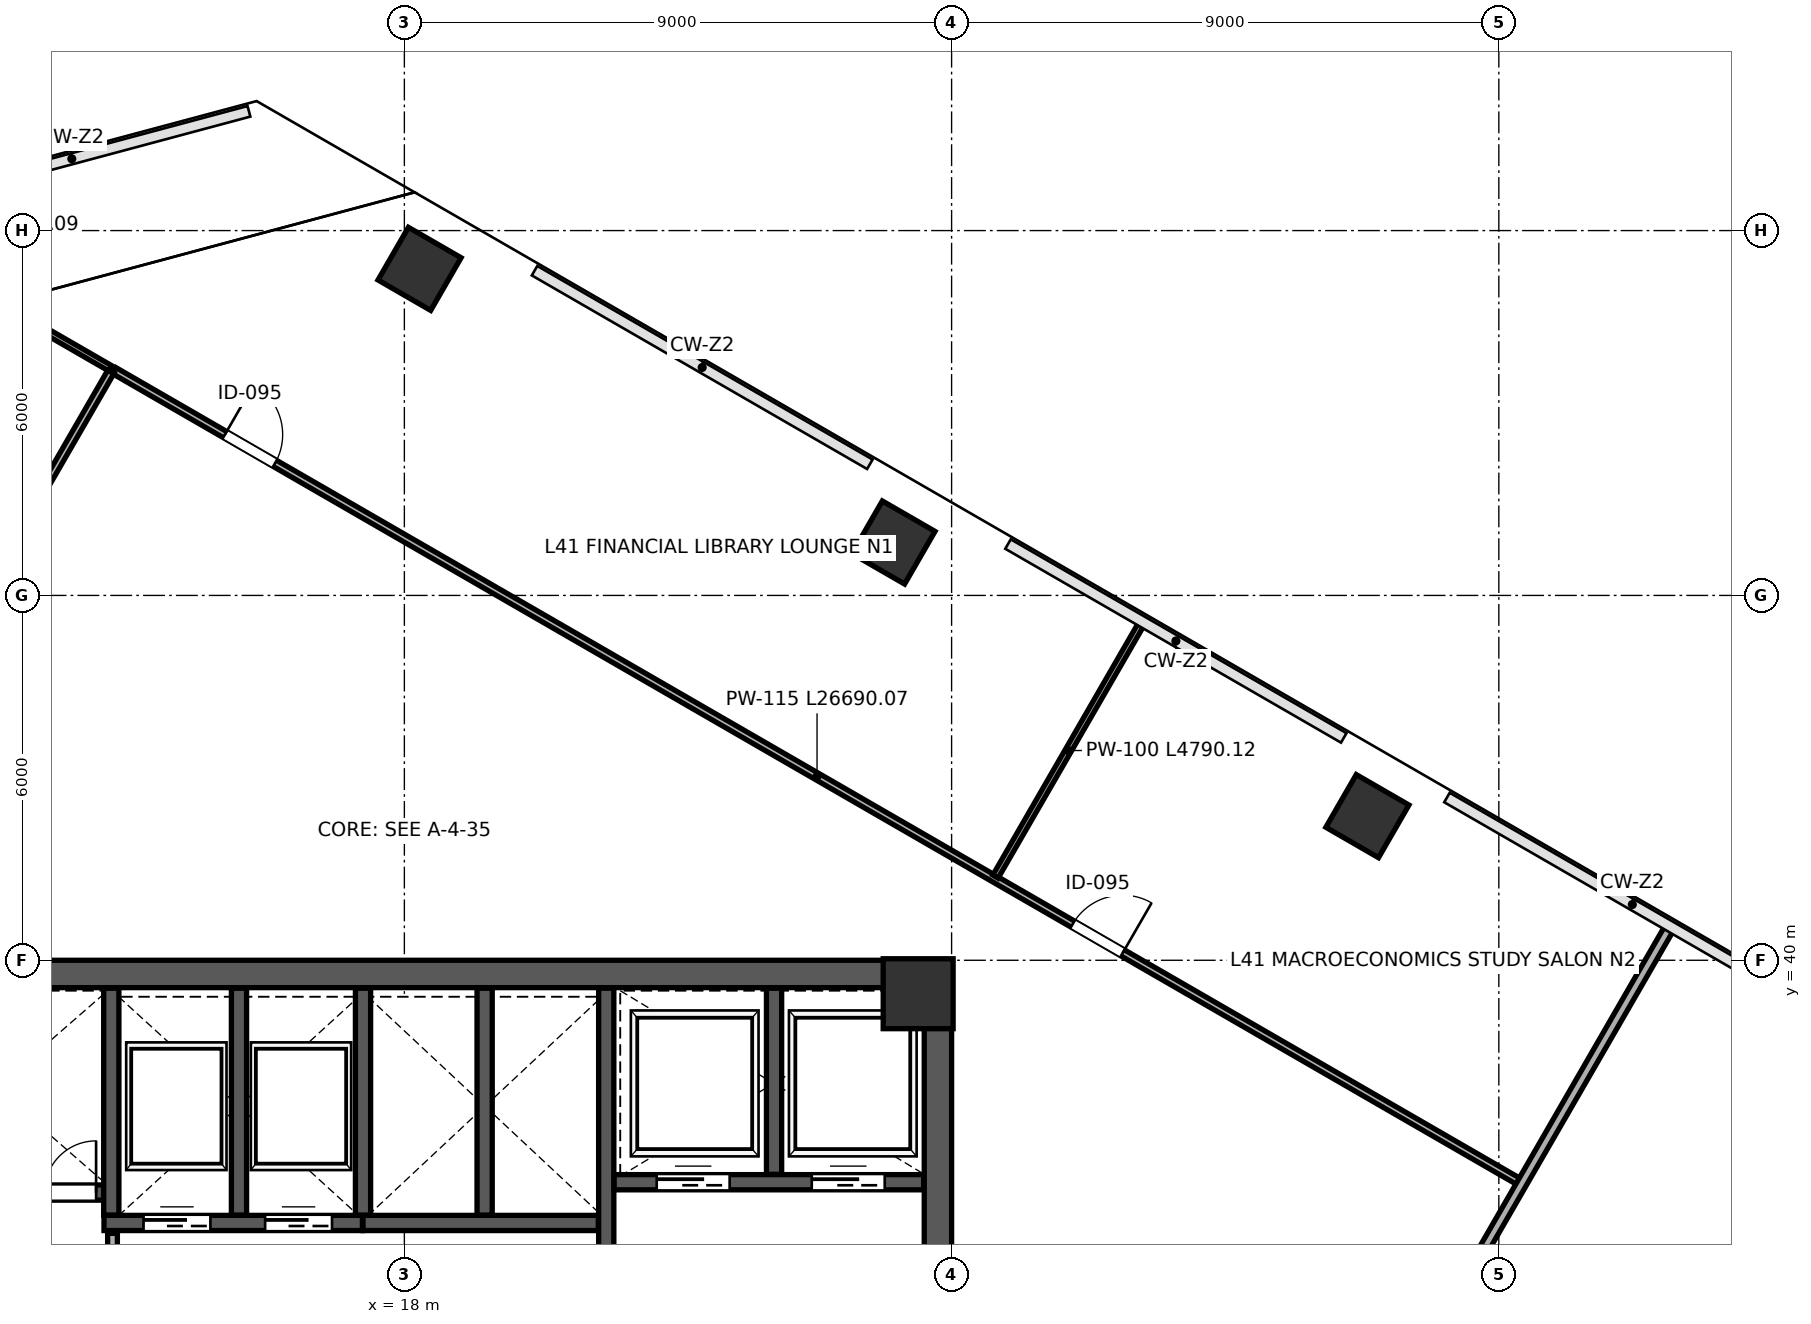
"""IFC4 building model, lengths in metres.
Left out: names, types, materials, properties, quantities, classifications, styles, units other than length and angle.
Written with IfcOpenShell. Run it as: python <this file> out.ifc"""

import sys

from ifc_helpers import new_model, si_unit, direction, frame, frame_2d, origin, origin_2d, place, context, subcontext, project, spatial, rectangle, extrude, clip, halfspace, source, transform, mapped, element, fill, save


model = new_model("IFC4")
c1 = context("Model", 3, precision=1e-05, world=origin(), true_north=direction((0.0, 1.0)))
c2 = subcontext(c1, "Body", "Model", "MODEL_VIEW")
j1 = project(units=[si_unit("LENGTHUNIT", "METRE"), si_unit("PLANEANGLEUNIT", "RADIAN")], contexts=[c1])
p1 = place(None, origin())
s1 = spatial("IfcSite", under=j1, at=p1, CompositionType="ELEMENT")
p2 = place(p1, origin())
s2 = spatial("IfcBuilding", under=s1, at=p2, CompositionType="ELEMENT")
p3 = place(p2, frame((0.0, 0.0, 183.4)))
s3 = spatial("IfcBuildingStorey", under=s2, at=p3, CompositionType="ELEMENT", Elevation=183.4)
m1 = source(origin(), c2, "Body", "SweptSolid", [
    extrude(rectangle(XDim=1.15, YDim=1.15, at=origin_2d()), origin(), (0.0, 0.0, 1.0), 4.199),
])
p4 = place(p3, frame((26.45, 39.45, 0.001), z_axis=(0.0, 0.0, 1.0), x_axis=(1.0, 0.0, 0.0)))
e1 = element("IfcColumn", 1, at=p4, inside=s3, PredefinedType="COLUMN", context=c2, shape_type="MappedRepresentation", body=[
    mapped(m1, transform((0.0, 0.0, 0.0), scale=1.0)),
])
p5 = place(p3, frame((18.25, 51.37, 0.0), z_axis=(0.197798041178, 0.028761304577, 0.979820760275), x_axis=(-0.360195902018, -0.92750800144, 0.099939078612)))
e2 = element("IfcColumn", 2, at=p5, inside=s3, PredefinedType="COLUMN", context=c2, shape_type="Clipping", body=[
    clip(clip(extrude(rectangle(XDim=1.0, YDim=1.0, at=origin_2d()), origin(), (0.0, 0.0, 1.0), 4.287), halfspace(frame((0.0, 0.0, 0.14), z_axis=(0.0, 0.0, -1.0), x_axis=(1.0, 0.0, 0.0)), False)), halfspace(frame((0.0, 0.0, 4.146), z_axis=(0.0, 0.0, 1.0), x_axis=(1.0, 0.0, 0.0)), False)),
])
p6 = place(p3, frame((26.044, 46.87, 0.0), z_axis=(0.151432058437, -0.049922656628, 0.987206189219), x_axis=(-0.739933914758, -0.667938482795, 0.079724431587)))
e3 = element("IfcColumn", 3, at=p6, inside=s3, PredefinedType="COLUMN", context=c2, shape_type="Clipping", body=[
    clip(clip(extrude(rectangle(XDim=1.0, YDim=1.0, at=origin_2d()), origin(), (0.0, 0.0, 1.0), 4.255), halfspace(frame((0.0, 0.0, 0.111), z_axis=(0.0, 0.0, -1.0), x_axis=(1.0, 0.0, 0.0)), False)), halfspace(frame((0.0, 0.0, 4.144), z_axis=(0.0, 0.0, 1.0), x_axis=(1.0, 0.0, 0.0)), False)),
])
p7 = place(p3, frame((33.838, 42.37, 0.0), z_axis=(0.103476944298, -0.128701240969, 0.986269999834), x_axis=(-0.98392787464, -0.158328979187, 0.082570405455)))
e4 = element("IfcColumn", 4, at=p7, inside=s3, PredefinedType="COLUMN", context=c2, shape_type="Clipping", body=[
    clip(clip(extrude(rectangle(XDim=1.0, YDim=1.0, at=origin_2d()), origin(), (0.0, 0.0, 1.0), 4.259), halfspace(frame((0.0, 0.0, 0.115), z_axis=(0.0, 0.0, -1.0), x_axis=(1.0, 0.0, 0.0)), False)), halfspace(frame((0.0, 0.0, 4.144), z_axis=(0.0, 0.0, 1.0), x_axis=(1.0, 0.0, 0.0)), False)),
])
p8 = place(p3, frame((10.907, 47.353, 0.0), z_axis=(0.158925035216, 0.104542428911, 0.981740145731), x_axis=(0.065841652164, -0.993286617888, 0.095113466792)))
e5 = element("IfcColumn", 5, at=p8, inside=s3, PredefinedType="PILASTER", context=c2, shape_type="Clipping", body=[
    clip(clip(extrude(rectangle(XDim=0.9, YDim=1.3, at=origin_2d()), origin(), (0.0, 0.0, 1.0), 4.278), halfspace(frame((0.0, 0.0, 0.153), z_axis=(0.0, 0.0, -1.0), x_axis=(1.0, 0.0, 0.0)), False)), halfspace(frame((0.0, 0.0, 4.125), z_axis=(0.0, 0.0, 1.0), x_axis=(1.0, 0.0, 0.0)), False)),
])
p9 = place(p3, frame((26.775, 24.45, 0.0), z_axis=(0.0, 0.0, 1.0), x_axis=(0.0, 1.0, 0.0)))
e6 = element("IfcWall", 6, at=p9, inside=s3, PredefinedType="SHEAR", context=c2, shape_type="SweptSolid", body=[
    extrude(rectangle(XDim=15.1, YDim=0.45, at=frame_2d((7.55, 0.0))), origin(), (0.0, 0.0, 1.0), 3.96),
])
p10 = place(p9, frame((8.6, 0.0, 0.0)))
e7 = element("IfcOpeningElement", 7, at=p10, cuts=e6, PredefinedType="OPENING", context=c2, shape_type="SweptSolid", body=[
    extrude(rectangle(XDim=1.15, YDim=2.2, at=frame_2d((0.575, 1.1))), frame((0.0, 0.235, 0.0), z_axis=(0.0, -1.0, 0.0), x_axis=(1.0, 0.0, 0.0)), (0.0, 0.0, 1.0), 0.47),
])
p11 = place(p3, frame((9.0, 39.775, 0.0), z_axis=(0.0, 0.0, 1.0), x_axis=(1.0, 0.0, 0.0)))
e8 = element("IfcWall", 8, at=p11, inside=s3, PredefinedType="SHEAR", context=c2, shape_type="SweptSolid", body=[
    extrude(rectangle(XDim=18.0, YDim=0.45, at=frame_2d((9.0, 0.0))), origin(), (0.0, 0.0, 1.0), 3.96),
])
p12 = place(p3, frame((21.32, 32.12, 0.0), z_axis=(0.0, 0.0, 1.0), x_axis=(0.0, 1.0, 0.0)))
e9 = element("IfcWall", 9, at=p12, inside=s3, PredefinedType="SHEAR", context=c2, shape_type="SweptSolid", body=[
    extrude(rectangle(XDim=7.42, YDim=0.25, at=frame_2d((3.71, 0.0))), origin(), (0.0, 0.0, 1.0), 3.96),
])
p13 = place(p12, frame((1.4, 0.0, 0.0)))
e10 = element("IfcOpeningElement", 10, at=p13, cuts=e9, PredefinedType="OPENING", context=c2, shape_type="SweptSolid", body=[
    extrude(rectangle(XDim=1.15, YDim=2.2, at=frame_2d((0.575, 1.1))), frame((0.0, 0.135, 0.0), z_axis=(0.0, -1.0, 0.0), x_axis=(1.0, 0.0, 0.0)), (0.0, 0.0, 1.0), 0.27),
])
p14 = place(p3, frame((9.46, 36.18, 0.0), z_axis=(0.0, 0.0, 1.0), x_axis=(1.0, 0.0, 0.0)))
e11 = element("IfcWall", 11, at=p14, inside=s3, PredefinedType="SHEAR", context=c2, shape_type="SweptSolid", body=[
    extrude(rectangle(XDim=3.79, YDim=0.25, at=frame_2d((1.895, 0.0))), origin(), (0.0, 0.0, 1.0), 3.96),
])
p15 = place(p14, frame((2.62, 0.0, 0.0)))
e12 = element("IfcOpeningElement", 12, at=p15, cuts=e11, PredefinedType="OPENING", context=c2, shape_type="SweptSolid", body=[
    extrude(rectangle(XDim=0.85, YDim=2.1, at=frame_2d((0.425, 1.05))), frame((0.0, 0.135, 0.0), z_axis=(0.0, -1.0, 0.0), x_axis=(1.0, 0.0, 0.0)), (0.0, 0.0, 1.0), 0.27),
])
p16 = place(p14, frame((0.85, 0.0, 0.0)))
e13 = element("IfcOpeningElement", 13, at=p16, cuts=e11, PredefinedType="OPENING", context=c2, shape_type="SweptSolid", body=[
    extrude(rectangle(XDim=1.3, YDim=2.25, at=frame_2d((0.65, 1.125))), frame((0.0, 0.135, 0.0), z_axis=(0.0, -1.0, 0.0), x_axis=(1.0, 0.0, 0.0)), (0.0, 0.0, 1.0), 0.27),
])
p17 = place(p3, frame((21.45, 36.35, 0.0), z_axis=(0.0, 0.0, 1.0), x_axis=(1.0, 0.0, 0.0)))
e14 = element("IfcWall", 14, at=p17, inside=s3, PredefinedType="SHEAR", context=c2, shape_type="SweptSolid", body=[
    extrude(rectangle(XDim=5.09, YDim=0.25, at=frame_2d((2.545, 0.0))), origin(), (0.0, 0.0, 1.0), 3.96),
])
p18 = place(p17, frame((0.7, 0.0, 0.0)))
e15 = element("IfcOpeningElement", 15, at=p18, cuts=e14, PredefinedType="OPENING", context=c2, shape_type="SweptSolid", body=[
    extrude(rectangle(XDim=1.2, YDim=2.2, at=frame_2d((0.6, 1.1))), frame((0.0, 0.135, 0.0), z_axis=(0.0, -1.0, 0.0), x_axis=(1.0, 0.0, 0.0)), (0.0, 0.0, 1.0), 0.27),
])
p19 = place(p17, frame((3.25, 0.0, 0.0)))
e16 = element("IfcOpeningElement", 16, at=p19, cuts=e14, PredefinedType="OPENING", context=c2, shape_type="SweptSolid", body=[
    extrude(rectangle(XDim=1.2, YDim=2.2, at=frame_2d((0.6, 1.1))), frame((0.0, 0.135, 0.0), z_axis=(0.0, -1.0, 0.0), x_axis=(1.0, 0.0, 0.0)), (0.0, 0.0, 1.0), 0.27),
])
p20 = place(p3, frame((24.08, 36.48, 0.0), z_axis=(0.0, 0.0, 1.0), x_axis=(0.0, 1.0, 0.0)))
e17 = element("IfcWall", 17, at=p20, inside=s3, PredefinedType="SHEAR", context=c2, shape_type="SweptSolid", body=[
    extrude(rectangle(XDim=3.06, YDim=0.25, at=frame_2d((1.53, 0.0))), origin(), (0.0, 0.0, 1.0), 3.96),
])
p21 = place(p3, frame((13.06, 35.68, 0.0), z_axis=(0.0, 0.0, 1.0), x_axis=(1.0, 0.0, 0.0)))
e18 = element("IfcWall", 18, at=p21, inside=s3, PredefinedType="SHEAR", context=c2, shape_type="SweptSolid", body=[
    extrude(rectangle(XDim=4.25, YDim=0.25, at=frame_2d((2.125, 0.0))), origin(), (0.0, 0.0, 1.0), 3.96),
])
p22 = place(p21, frame((0.65, 0.0, 0.0)))
e19 = element("IfcOpeningElement", 19, at=p22, cuts=e18, PredefinedType="OPENING", context=c2, shape_type="SweptSolid", body=[
    extrude(rectangle(XDim=1.1, YDim=2.2, at=frame_2d((0.55, 1.1))), frame((0.0, 0.135, 0.0), z_axis=(0.0, -1.0, 0.0), x_axis=(1.0, 0.0, 0.0)), (0.0, 0.0, 1.0), 0.27),
])
p23 = place(p21, frame((2.65, 0.0, 0.0)))
e20 = element("IfcOpeningElement", 20, at=p23, cuts=e18, PredefinedType="OPENING", context=c2, shape_type="SweptSolid", body=[
    extrude(rectangle(XDim=1.1, YDim=2.2, at=frame_2d((0.55, 1.1))), frame((0.0, 0.135, 0.0), z_axis=(0.0, -1.0, 0.0), x_axis=(1.0, 0.0, 0.0)), (0.0, 0.0, 1.0), 0.27),
])
for number, where, z_axis, x_axis in (
    (21, (13.18, 35.81, 0.0), (0.0, 0.0, 1.0), (0.0, 1.0, 0.0)),
    (22, (15.28, 35.81, 0.0), (0.0, 0.0, 1.0), (0.0, 1.0, 0.0)),
):
    element("IfcWall", number, at=place(p3, frame(where, z_axis=z_axis, x_axis=x_axis)), inside=s3, PredefinedType="SHEAR", context=c2, shape_type="SweptSolid", body=[
        extrude(rectangle(XDim=3.73, YDim=0.25, at=frame_2d((1.865, 0.0))), origin(), (0.0, 0.0, 1.0), 3.96),
    ])
p24 = place(p3, frame((17.32, 35.68, 0.0), z_axis=(0.0, 0.0, 1.0), x_axis=(1.0, 0.0, 0.0)))
e23 = element("IfcWall", 23, at=p24, inside=s3, PredefinedType="SHEAR", context=c2, shape_type="SweptSolid", body=[
    extrude(rectangle(XDim=3.87, YDim=0.25, at=frame_2d((1.935, 0.0))), origin(), (0.0, 0.0, 1.0), 3.96),
])
for number, where, z_axis, x_axis in (
    (24, (17.32, 35.81, 0.0), (0.0, 0.0, 1.0), (0.0, 1.0, 0.0)),
    (25, (19.32, 35.81, 0.0), (0.0, 0.0, 1.0), (0.0, 1.0, 0.0)),
):
    element("IfcWall", number, at=place(p3, frame(where, z_axis=z_axis, x_axis=x_axis)), inside=s3, PredefinedType="SHEAR", context=c2, shape_type="SweptSolid", body=[
        extrude(rectangle(XDim=3.73, YDim=0.25, at=frame_2d((1.865, 0.0))), origin(), (0.0, 0.0, 1.0), 3.96),
    ])
p25 = place(p3, frame((13.2, 34.57, 0.0), z_axis=(0.0, 0.0, 1.0), x_axis=(0.0, 1.0, 0.0)))
e26 = element("IfcWall", 26, at=p25, inside=s3, PredefinedType="PARTITIONING", context=c2, shape_type="SweptSolid", body=[
    extrude(rectangle(XDim=0.94, YDim=0.16, at=frame_2d((0.47, 0.0))), origin(), (0.0, 0.0, 1.0), 3.96),
])
p26 = place(p3, frame((13.23, 49.696, 0.0), z_axis=(0.0, 0.0, 1.0), x_axis=(0.866026251752, -0.499998531275, 0.0)))
e27 = element("IfcWall", 27, at=p26, inside=s3, PredefinedType="PARTITIONING", context=c2, shape_type="SweptSolid", body=[
    extrude(rectangle(XDim=26.69, YDim=0.115, at=frame_2d((13.345, 0.0))), origin(), (0.0, 0.0, 1.0), 3.96),
])
p27 = place(p26, frame((2.1, 0.0, 0.0)))
e28 = element("IfcOpeningElement", 28, at=p27, cuts=e27, PredefinedType="OPENING", context=c2, shape_type="SweptSolid", body=[
    extrude(rectangle(XDim=0.95, YDim=2.15, at=frame_2d((0.475, 1.075))), frame((0.0, 0.067, 0.0), z_axis=(0.0, -1.0, 0.0), x_axis=(1.0, 0.0, 0.0)), (0.0, 0.0, 1.0), 0.135),
])
p28 = place(p26, frame((18.2, 0.0, 0.0)))
e29 = element("IfcOpeningElement", 29, at=p28, cuts=e27, PredefinedType="OPENING", context=c2, shape_type="SweptSolid", body=[
    extrude(rectangle(XDim=0.95, YDim=2.15, at=frame_2d((0.475, 1.075))), frame((0.0, 0.067, 0.0), z_axis=(0.0, -1.0, 0.0), x_axis=(1.0, 0.0, 0.0)), (0.0, 0.0, 1.0), 0.135),
])
p29 = place(p3, frame((27.721, 41.375, 0.0), z_axis=(0.0, 0.0, 1.0), x_axis=(0.500009234706, 0.866020072059, 0.0)))
e30 = element("IfcWall", 30, at=p29, inside=s3, PredefinedType="PARTITIONING", context=c2, shape_type="SweptSolid", body=[
    extrude(rectangle(XDim=4.79, YDim=0.1, at=frame_2d((2.395, 0.0))), origin(), (0.0, 0.0, 1.0), 3.195),
])
p30 = place(p3, frame((1.625, 29.676, 0.0), z_axis=(0.0, 0.0, 1.0), x_axis=(0.500002707681, 0.866023840498, 0.0)))
e31 = element("IfcWall", 31, at=p30, inside=s3, PredefinedType="PARTITIONING", context=c2, shape_type="SweptSolid", body=[
    extrude(rectangle(XDim=23.1, YDim=0.115, at=frame_2d((11.55, 0.0))), origin(), (0.0, 0.0, 1.0), 3.96),
])
p31 = place(p30, frame((1.3, 0.0, 0.0)))
e32 = element("IfcOpeningElement", 32, at=p31, cuts=e31, PredefinedType="OPENING", context=c2, shape_type="SweptSolid", body=[
    extrude(rectangle(XDim=0.95, YDim=2.15, at=frame_2d((0.475, 1.075))), frame((0.0, 0.067, 0.0), z_axis=(0.0, -1.0, 0.0), x_axis=(1.0, 0.0, 0.0)), (0.0, 0.0, 1.0), 0.135),
])
p32 = place(p30, frame((14.6, 0.0, 0.0)))
e33 = element("IfcOpeningElement", 33, at=p32, cuts=e31, PredefinedType="OPENING", context=c2, shape_type="SweptSolid", body=[
    extrude(rectangle(XDim=0.95, YDim=2.15, at=frame_2d((0.475, 1.075))), frame((0.0, 0.067, 0.0), z_axis=(0.0, -1.0, 0.0), x_axis=(1.0, 0.0, 0.0)), (0.0, 0.0, 1.0), 0.135),
])
p33 = place(p3, frame((9.324, 51.951, 0.0), z_axis=(0.0, 0.0, 1.0), x_axis=(0.866036909293, -0.499980071345, 0.0)))
e34 = element("IfcWall", 34, at=p33, inside=s3, PredefinedType="PARTITIONING", context=c2, shape_type="SweptSolid", body=[
    extrude(rectangle(XDim=4.43, YDim=0.1, at=frame_2d((2.215, 0.0))), origin(), (0.0, 0.0, 1.0), 3.96),
])
p34 = place(p3, frame((32.574, 29.74, 0.0), z_axis=(0.0, 0.0, 1.0), x_axis=(0.499986899807, 0.866032967052, 0.0)))
e35 = element("IfcWall", 35, at=p34, inside=s3, PredefinedType="PARTITIONING", context=c2, shape_type="SweptSolid", body=[
    extrude(rectangle(XDim=12.44, YDim=0.16, at=frame_2d((6.22, 0.0))), origin(), (0.0, 0.0, 1.0), 3.195),
])
m2 = source(origin(), c2, "Body", "SweptSolid", [
    extrude(rectangle(XDim=0.85, YDim=2.1, at=frame_2d((0.425, 1.05))), frame((0.0, 0.025, 0.0), z_axis=(0.0, -1.0, 0.0), x_axis=(1.0, 0.0, 0.0)), (0.0, 0.0, 1.0), 0.05),
])
p35 = place(p15, origin())
e36 = element("IfcDoor", 36, at=p35, inside=s3, OperationType="SINGLE_SWING_RIGHT", PredefinedType="DOOR", context=c2, shape_type="MappedRepresentation", body=[
    mapped(m2, transform((0.0, 0.0, 0.0), scale=1.0)),
])
fill(e12, e36)
m3 = source(origin(), c2, "Body", "SweptSolid", [
    extrude(rectangle(XDim=1.1, YDim=2.2, at=frame_2d((0.55, 1.1))), frame((0.0, 0.025, 0.0), z_axis=(0.0, -1.0, 0.0), x_axis=(1.0, 0.0, 0.0)), (0.0, 0.0, 1.0), 0.05),
])
p36 = place(p22, origin())
e37 = element("IfcDoor", 37, at=p36, inside=s3, OperationType="SLIDING_TO_LEFT", PredefinedType="DOOR", context=c2, shape_type="MappedRepresentation", body=[
    mapped(m3, transform((0.0, 0.0, 0.0), scale=1.0)),
])
fill(e19, e37)
p37 = place(p23, origin())
e38 = element("IfcDoor", 38, at=p37, inside=s3, OperationType="SLIDING_TO_RIGHT", PredefinedType="DOOR", context=c2, shape_type="MappedRepresentation", body=[
    mapped(m3, transform((0.0, 0.0, 0.0), scale=1.0)),
])
fill(e20, e38)
m4 = source(origin(), c2, "Body", "SweptSolid", [
    extrude(rectangle(XDim=1.2, YDim=2.2, at=frame_2d((0.6, 1.1))), frame((0.0, 0.025, 0.0), z_axis=(0.0, -1.0, 0.0), x_axis=(1.0, 0.0, 0.0)), (0.0, 0.0, 1.0), 0.05),
])
p38 = place(p18, origin())
e39 = element("IfcDoor", 39, at=p38, inside=s3, OperationType="SLIDING_TO_LEFT", PredefinedType="DOOR", context=c2, shape_type="MappedRepresentation", body=[
    mapped(m4, transform((0.0, 0.0, 0.0), scale=1.0)),
])
fill(e15, e39)
p39 = place(p19, origin())
e40 = element("IfcDoor", 40, at=p39, inside=s3, OperationType="SLIDING_TO_RIGHT", PredefinedType="DOOR", context=c2, shape_type="MappedRepresentation", body=[
    mapped(m4, transform((0.0, 0.0, 0.0), scale=1.0)),
])
fill(e16, e40)
m5 = source(origin(), c2, "Body", "SweptSolid", [
    extrude(rectangle(XDim=0.95, YDim=2.15, at=frame_2d((0.475, 1.075))), frame((0.0, 0.025, 0.0), z_axis=(0.0, -1.0, 0.0), x_axis=(1.0, 0.0, 0.0)), (0.0, 0.0, 1.0), 0.05),
])
p40 = place(p27, origin())
e41 = element("IfcDoor", 41, at=p40, inside=s3, OperationType="SINGLE_SWING_LEFT", PredefinedType="DOOR", context=c2, shape_type="MappedRepresentation", body=[
    mapped(m5, transform((0.0, 0.0, 0.0), scale=1.0)),
])
fill(e28, e41)
p41 = place(p28, origin())
e42 = element("IfcDoor", 42, at=p41, inside=s3, OperationType="SINGLE_SWING_RIGHT", PredefinedType="DOOR", context=c2, shape_type="MappedRepresentation", body=[
    mapped(m5, transform((0.0, 0.0, 0.0), scale=1.0)),
])
fill(e29, e42)
save(model, sys.argv[1])
